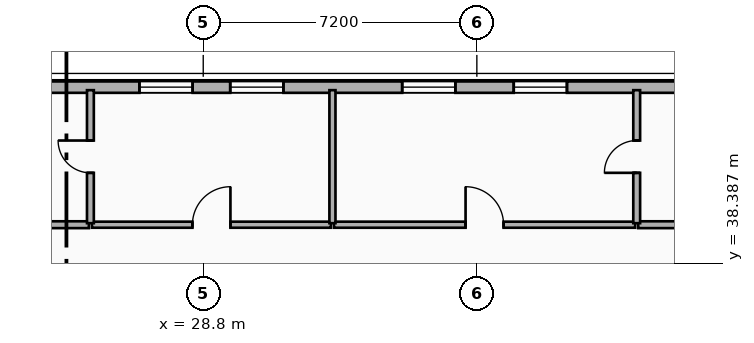
"""IFC4 building model, lengths in metres.
Left out: names, types, materials, properties, quantities, classifications, styles, units other than length and angle.
Written with IfcOpenShell. Run it as: python <this file> out.ifc"""

import sys

from ifc_helpers import new_model, si_unit, direction, frame, frame_2d, origin, place, context, subcontext, project, spatial, rectangle, extrude, element, fill, save


model = new_model("IFC4")
c1 = context("Model", 3, precision=1e-05, world=origin(), true_north=direction((0.0, 1.0)))
c2 = subcontext(c1, "Body", "Model", "MODEL_VIEW")
j1 = project(units=[si_unit("LENGTHUNIT", "METRE"), si_unit("PLANEANGLEUNIT", "RADIAN")], contexts=[c1])
p1 = place(None, origin())
s1 = spatial("IfcSite", under=j1, at=p1, CompositionType="ELEMENT")
p2 = place(p1, origin())
s2 = spatial("IfcBuilding", under=s1, at=p2, CompositionType="ELEMENT")
p3 = place(p2, frame((0.0, 0.0, 94.3)))
s3 = spatial("IfcBuildingStorey", under=s2, at=p3, CompositionType="ELEMENT", Elevation=94.3)
p4 = place(p3, frame((4.2, 43.02, 0.0), z_axis=(0.0, 0.0, 1.0), x_axis=(1.0, 0.0, 0.0)))
e1 = element("IfcWall", 1, at=p4, inside=s3, PredefinedType="SOLIDWALL", context=c2, shape_type="SweptSolid", body=[
    extrude(rectangle(XDim=49.2, YDim=0.3, at=frame_2d((24.6, 0.0))), origin(), (0.0, 0.0, 1.0), 3.24),
])
p5 = place(p4, frame((4.695, 0.0, 0.85)))
e2 = element("IfcOpeningElement", 2, at=p5, cuts=e1, PredefinedType="OPENING", context=c2, shape_type="SweptSolid", body=[
    extrude(rectangle(XDim=1.4, YDim=1.8, at=frame_2d((0.7, 0.9))), frame((0.0, 0.16, 0.0), z_axis=(0.0, -1.0, 0.0), x_axis=(1.0, 0.0, 0.0)), (0.0, 0.0, 1.0), 0.32),
])
p6 = place(p4, frame((7.631, 0.0, 0.85)))
e3 = element("IfcOpeningElement", 3, at=p6, cuts=e1, PredefinedType="OPENING", context=c2, shape_type="SweptSolid", body=[
    extrude(rectangle(XDim=1.4, YDim=1.8, at=frame_2d((0.7, 0.9))), frame((0.0, 0.16, 0.0), z_axis=(0.0, -1.0, 0.0), x_axis=(1.0, 0.0, 0.0)), (0.0, 0.0, 1.0), 0.32),
])
p7 = place(p4, frame((15.417, 0.0, 0.85)))
e4 = element("IfcOpeningElement", 4, at=p7, cuts=e1, PredefinedType="OPENING", context=c2, shape_type="SweptSolid", body=[
    extrude(rectangle(XDim=1.4, YDim=1.8, at=frame_2d((0.7, 0.9))), frame((0.0, 0.16, 0.0), z_axis=(0.0, -1.0, 0.0), x_axis=(1.0, 0.0, 0.0)), (0.0, 0.0, 1.0), 0.32),
])
p8 = place(p4, frame((17.369, 0.0, 0.85)))
e5 = element("IfcOpeningElement", 5, at=p8, cuts=e1, PredefinedType="OPENING", context=c2, shape_type="SweptSolid", body=[
    extrude(rectangle(XDim=1.4, YDim=1.8, at=frame_2d((0.7, 0.9))), frame((0.0, 0.16, 0.0), z_axis=(0.0, -1.0, 0.0), x_axis=(1.0, 0.0, 0.0)), (0.0, 0.0, 1.0), 0.32),
])
p9 = place(p4, frame((22.921, 0.0, 0.85)))
e6 = element("IfcOpeningElement", 6, at=p9, cuts=e1, PredefinedType="OPENING", context=c2, shape_type="SweptSolid", body=[
    extrude(rectangle(XDim=1.4, YDim=1.8, at=frame_2d((0.7, 0.9))), frame((0.0, 0.16, 0.0), z_axis=(0.0, -1.0, 0.0), x_axis=(1.0, 0.0, 0.0)), (0.0, 0.0, 1.0), 0.32),
])
p10 = place(p4, frame((25.31, 0.0, 0.85)))
e7 = element("IfcOpeningElement", 7, at=p10, cuts=e1, PredefinedType="OPENING", context=c2, shape_type="SweptSolid", body=[
    extrude(rectangle(XDim=1.4, YDim=1.8, at=frame_2d((0.7, 0.9))), frame((0.0, 0.16, 0.0), z_axis=(0.0, -1.0, 0.0), x_axis=(1.0, 0.0, 0.0)), (0.0, 0.0, 1.0), 0.32),
])
p11 = place(p4, frame((29.835, 0.0, 0.85)))
e8 = element("IfcOpeningElement", 8, at=p11, cuts=e1, PredefinedType="OPENING", context=c2, shape_type="SweptSolid", body=[
    extrude(rectangle(XDim=1.4, YDim=1.8, at=frame_2d((0.7, 0.9))), frame((0.0, 0.16, 0.0), z_axis=(0.0, -1.0, 0.0), x_axis=(1.0, 0.0, 0.0)), (0.0, 0.0, 1.0), 0.32),
])
p12 = place(p4, frame((32.771, 0.0, 0.85)))
e9 = element("IfcOpeningElement", 9, at=p12, cuts=e1, PredefinedType="OPENING", context=c2, shape_type="SweptSolid", body=[
    extrude(rectangle(XDim=1.4, YDim=1.8, at=frame_2d((0.7, 0.9))), frame((0.0, 0.16, 0.0), z_axis=(0.0, -1.0, 0.0), x_axis=(1.0, 0.0, 0.0)), (0.0, 0.0, 1.0), 0.32),
])
p13 = place(p4, frame((40.437, 0.0, 0.85)))
e10 = element("IfcOpeningElement", 10, at=p13, cuts=e1, PredefinedType="OPENING", context=c2, shape_type="SweptSolid", body=[
    extrude(rectangle(XDim=1.4, YDim=1.8, at=frame_2d((0.7, 0.9))), frame((0.0, 0.16, 0.0), z_axis=(0.0, -1.0, 0.0), x_axis=(1.0, 0.0, 0.0)), (0.0, 0.0, 1.0), 0.32),
])
p14 = place(p4, frame((42.269, 0.0, 0.85)))
e11 = element("IfcOpeningElement", 11, at=p14, cuts=e1, PredefinedType="OPENING", context=c2, shape_type="SweptSolid", body=[
    extrude(rectangle(XDim=1.4, YDim=1.8, at=frame_2d((0.7, 0.9))), frame((0.0, 0.16, 0.0), z_axis=(0.0, -1.0, 0.0), x_axis=(1.0, 0.0, 0.0)), (0.0, 0.0, 1.0), 0.32),
])
p15 = place(p4, frame((47.115, 0.0, 0.85)))
e12 = element("IfcOpeningElement", 12, at=p15, cuts=e1, PredefinedType="OPENING", context=c2, shape_type="SweptSolid", body=[
    extrude(rectangle(XDim=1.4, YDim=1.8, at=frame_2d((0.7, 0.9))), frame((0.0, 0.16, 0.0), z_axis=(0.0, -1.0, 0.0), x_axis=(1.0, 0.0, 0.0)), (0.0, 0.0, 1.0), 0.32),
])
p16 = place(p3, frame((25.871, 39.4, 0.0), z_axis=(0.0, 0.0, 1.0), x_axis=(1.0, 0.0, 0.0)))
e13 = element("IfcWall", 13, at=p16, inside=s3, PredefinedType="PARTITIONING", context=c2, shape_type="SweptSolid", body=[
    extrude(rectangle(XDim=6.289, YDim=0.16, at=frame_2d((3.145, 0.0))), origin(), (0.0, 0.0, 1.0), 3.24),
])
p17 = place(p16, frame((2.645, 0.0, 0.0)))
e14 = element("IfcOpeningElement", 14, at=p17, cuts=e13, PredefinedType="OPENING", context=c2, shape_type="SweptSolid", body=[
    extrude(rectangle(XDim=1.0, YDim=2.15, at=frame_2d((0.5, 1.075))), frame((0.0, 0.09, 0.0), z_axis=(0.0, -1.0, 0.0), x_axis=(1.0, 0.0, 0.0)), (0.0, 0.0, 1.0), 0.18),
])
p18 = place(p3, frame((23.86, 39.4, 0.0), z_axis=(0.0, 0.0, 1.0), x_axis=(1.0, 0.0, 0.0)))
e15 = element("IfcWall", 15, at=p18, inside=s3, PredefinedType="PLUMBINGWALL", context=c2, shape_type="SweptSolid", body=[
    extrude(rectangle(XDim=1.931, YDim=0.18, at=frame_2d((0.965, 0.0))), origin(), (0.0, 0.0, 1.0), 3.24),
])
p19 = place(p3, frame((32.24, 39.4, 0.0), z_axis=(0.0, 0.0, 1.0), x_axis=(1.0, 0.0, 0.0)))
e16 = element("IfcWall", 16, at=p19, inside=s3, PredefinedType="PARTITIONING", context=c2, shape_type="SweptSolid", body=[
    extrude(rectangle(XDim=7.926, YDim=0.16, at=frame_2d((3.963, 0.0))), origin(), (0.0, 0.0, 1.0), 3.24),
])
p20 = place(p19, frame((3.463, 0.0, 0.0)))
e17 = element("IfcOpeningElement", 17, at=p20, cuts=e16, PredefinedType="OPENING", context=c2, shape_type="SweptSolid", body=[
    extrude(rectangle(XDim=1.0, YDim=2.15, at=frame_2d((0.5, 1.075))), frame((0.0, 0.09, 0.0), z_axis=(0.0, -1.0, 0.0), x_axis=(1.0, 0.0, 0.0)), (0.0, 0.0, 1.0), 0.18),
])
p21 = place(p3, frame((40.246, 39.4, 0.0), z_axis=(0.0, 0.0, 1.0), x_axis=(1.0, 0.0, 0.0)))
e18 = element("IfcWall", 18, at=p21, inside=s3, PredefinedType="PLUMBINGWALL", context=c2, shape_type="SweptSolid", body=[
    extrude(rectangle(XDim=1.97, YDim=0.18, at=frame_2d((0.985, 0.0))), origin(), (0.0, 0.0, 1.0), 3.24),
])
p22 = place(p3, frame((25.831, 39.44, 0.0), z_axis=(0.0, 0.0, 1.0), x_axis=(0.0, 1.0, 0.0)))
e19 = element("IfcWall", 19, at=p22, inside=s3, PredefinedType="PLUMBINGWALL", context=c2, shape_type="SweptSolid", body=[
    extrude(rectangle(XDim=3.5, YDim=0.18, at=frame_2d((1.75, 0.0))), origin(), (0.0, 0.0, 1.0), 3.24),
])
p23 = place(p22, frame((1.325, 0.0, 0.0)))
e20 = element("IfcOpeningElement", 20, at=p23, cuts=e19, PredefinedType="OPENING", context=c2, shape_type="SweptSolid", body=[
    extrude(rectangle(XDim=0.85, YDim=2.1, at=frame_2d((0.425, 1.05))), frame((0.0, 0.1, 0.0), z_axis=(0.0, -1.0, 0.0), x_axis=(1.0, 0.0, 0.0)), (0.0, 0.0, 1.0), 0.2),
])
p24 = place(p3, frame((32.2, 39.44, 0.0), z_axis=(0.0, 0.0, 1.0), x_axis=(0.0, 1.0, 0.0)))
e21 = element("IfcWall", 21, at=p24, inside=s3, PredefinedType="PARTITIONING", context=c2, shape_type="SweptSolid", body=[
    extrude(rectangle(XDim=3.5, YDim=0.16, at=frame_2d((1.75, 0.0))), origin(), (0.0, 0.0, 1.0), 3.24),
])
p25 = place(p3, frame((40.206, 39.44, 0.0), z_axis=(0.0, 0.0, 1.0), x_axis=(0.0, 1.0, 0.0)))
e22 = element("IfcWall", 22, at=p25, inside=s3, PredefinedType="PLUMBINGWALL", context=c2, shape_type="SweptSolid", body=[
    extrude(rectangle(XDim=3.5, YDim=0.18, at=frame_2d((1.75, 0.0))), origin(), (0.0, 0.0, 1.0), 3.24),
])
p26 = place(p25, frame((1.325, 0.0, 0.0)))
e23 = element("IfcOpeningElement", 23, at=p26, cuts=e22, PredefinedType="OPENING", context=c2, shape_type="SweptSolid", body=[
    extrude(rectangle(XDim=0.85, YDim=2.1, at=frame_2d((0.425, 1.05))), frame((0.0, 0.1, 0.0), z_axis=(0.0, -1.0, 0.0), x_axis=(1.0, 0.0, 0.0)), (0.0, 0.0, 1.0), 0.2),
])
p27 = place(p9, origin())
e24 = element("IfcWindow", 24, at=p27, inside=s3, PartitioningType="SINGLE_PANEL", PredefinedType="WINDOW", context=c2, shape_type="SweptSolid", body=[
    extrude(rectangle(XDim=1.4, YDim=1.8, at=frame_2d((0.7, 0.9))), frame((0.0, 0.03, 0.0), z_axis=(0.0, -1.0, 0.0), x_axis=(1.0, 0.0, 0.0)), (0.0, 0.0, 1.0), 0.06),
])
fill(e6, e24)
p28 = place(p10, origin())
e25 = element("IfcWindow", 25, at=p28, inside=s3, PartitioningType="SINGLE_PANEL", PredefinedType="WINDOW", context=c2, shape_type="SweptSolid", body=[
    extrude(rectangle(XDim=1.4, YDim=1.8, at=frame_2d((0.7, 0.9))), frame((0.0, 0.03, 0.0), z_axis=(0.0, -1.0, 0.0), x_axis=(1.0, 0.0, 0.0)), (0.0, 0.0, 1.0), 0.06),
])
fill(e7, e25)
p29 = place(p11, origin())
e26 = element("IfcWindow", 26, at=p29, inside=s3, PartitioningType="SINGLE_PANEL", PredefinedType="WINDOW", context=c2, shape_type="SweptSolid", body=[
    extrude(rectangle(XDim=1.4, YDim=1.8, at=frame_2d((0.7, 0.9))), frame((0.0, 0.03, 0.0), z_axis=(0.0, -1.0, 0.0), x_axis=(1.0, 0.0, 0.0)), (0.0, 0.0, 1.0), 0.06),
])
fill(e8, e26)
p30 = place(p12, origin())
e27 = element("IfcWindow", 27, at=p30, inside=s3, PartitioningType="SINGLE_PANEL", PredefinedType="WINDOW", context=c2, shape_type="SweptSolid", body=[
    extrude(rectangle(XDim=1.4, YDim=1.8, at=frame_2d((0.7, 0.9))), frame((0.0, 0.03, 0.0), z_axis=(0.0, -1.0, 0.0), x_axis=(1.0, 0.0, 0.0)), (0.0, 0.0, 1.0), 0.06),
])
fill(e9, e27)
p31 = place(p17, origin())
e28 = element("IfcDoor", 28, at=p31, inside=s3, OperationType="SINGLE_SWING_RIGHT", PredefinedType="DOOR", context=c2, shape_type="SweptSolid", body=[
    extrude(rectangle(XDim=1.0, YDim=2.15, at=frame_2d((0.5, 1.075))), frame((0.0, 0.025, 0.0), z_axis=(0.0, -1.0, 0.0), x_axis=(1.0, 0.0, 0.0)), (0.0, 0.0, 1.0), 0.05),
])
fill(e14, e28)
p32 = place(p20, origin())
e29 = element("IfcDoor", 29, at=p32, inside=s3, OperationType="SINGLE_SWING_LEFT", PredefinedType="DOOR", context=c2, shape_type="SweptSolid", body=[
    extrude(rectangle(XDim=1.0, YDim=2.15, at=frame_2d((0.5, 1.075))), frame((0.0, 0.025, 0.0), z_axis=(0.0, -1.0, 0.0), x_axis=(1.0, 0.0, 0.0)), (0.0, 0.0, 1.0), 0.05),
])
fill(e17, e29)
p33 = place(p23, origin())
e30 = element("IfcDoor", 30, at=p33, inside=s3, OperationType="SINGLE_SWING_RIGHT", PredefinedType="DOOR", context=c2, shape_type="SweptSolid", body=[
    extrude(rectangle(XDim=0.85, YDim=2.1, at=frame_2d((0.425, 1.05))), frame((0.0, 0.025, 0.0), z_axis=(0.0, -1.0, 0.0), x_axis=(1.0, 0.0, 0.0)), (0.0, 0.0, 1.0), 0.05),
])
fill(e20, e30)
p34 = place(p26, origin())
e31 = element("IfcDoor", 31, at=p34, inside=s3, OperationType="SINGLE_SWING_LEFT", PredefinedType="DOOR", context=c2, shape_type="SweptSolid", body=[
    extrude(rectangle(XDim=0.85, YDim=2.1, at=frame_2d((0.425, 1.05))), frame((0.0, 0.025, 0.0), z_axis=(0.0, -1.0, 0.0), x_axis=(1.0, 0.0, 0.0)), (0.0, 0.0, 1.0), 0.05),
])
fill(e23, e31)
save(model, sys.argv[1])
